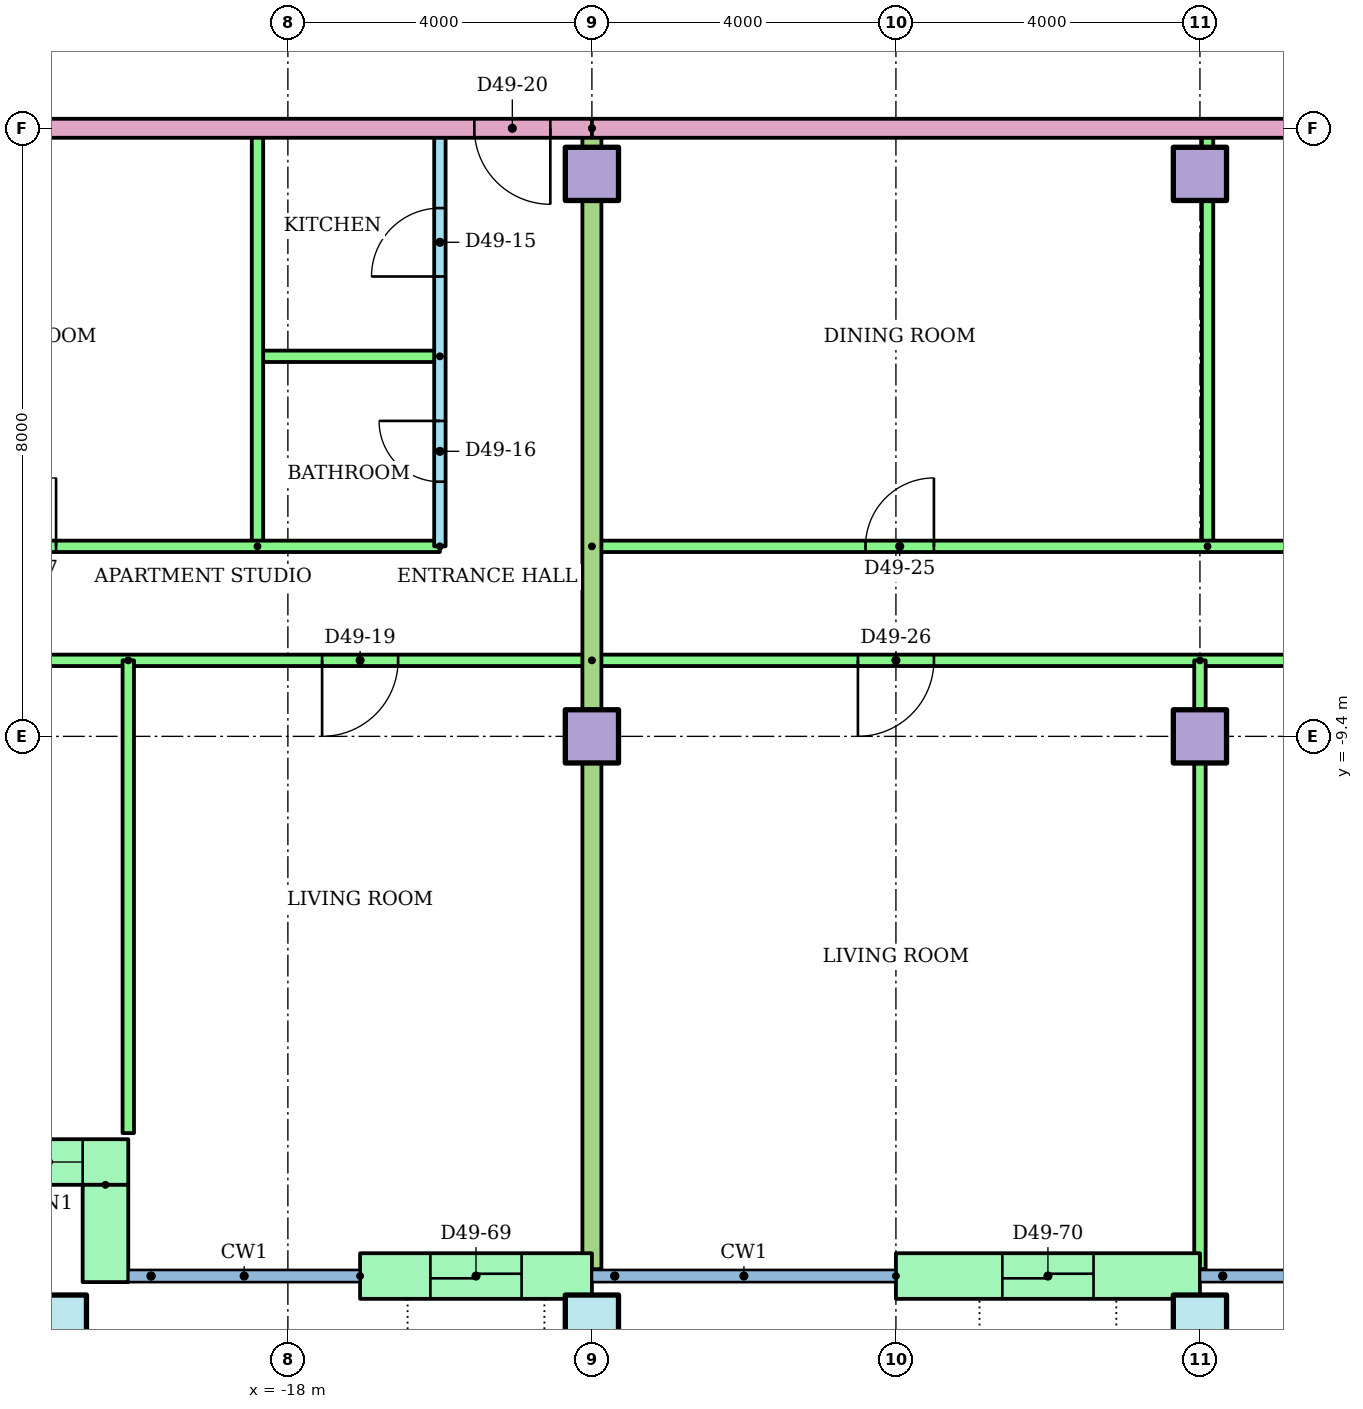
"""IFC4 building model, lengths in metres.
Left out: names, types, materials, properties, quantities, classifications, styles, units other than length and angle.
Written with IfcOpenShell. Run it as: python <this file> out.ifc"""

import sys

from ifc_helpers import new_model, si_unit, direction, frame, frame_2d, origin, origin_2d, place, context, subcontext, project, spatial, rectangle, hollow_rectangle, extrude, element, fill, save


model = new_model("IFC4")
c1 = context("Model", 3, precision=1e-05, world=origin(), true_north=direction((0.0, 1.0)))
c2 = subcontext(c1, "Body", "Model", "MODEL_VIEW")
j1 = project(units=[si_unit("LENGTHUNIT", "METRE"), si_unit("PLANEANGLEUNIT", "RADIAN")], contexts=[c1])
p1 = place(None, origin())
s1 = spatial("IfcSite", under=j1, at=p1, CompositionType="ELEMENT")
p2 = place(p1, origin())
s2 = spatial("IfcBuilding", under=s1, at=p2, CompositionType="ELEMENT")
p3 = place(p2, frame((0.0, 0.0, 187.7)))
s3 = spatial("IfcBuildingStorey", under=s2, at=p3, CompositionType="ELEMENT", Elevation=187.7)
for number, where in (
    (1, (-21.0, -17.1, 0.0)),
    (2, (-14.0, -17.1, 0.0)),
    (3, (-6.0, -17.1, 0.0)),
):
    element("IfcColumn", number, at=place(p3, frame(where)), inside=s3, PredefinedType="COLUMN", context=c2, shape_type="SweptSolid", body=[
        extrude(hollow_rectangle(XDim=0.7, YDim=0.7, WallThickness=0.036, at=origin_2d()), origin(), (0.0, 0.0, 1.0), 3.2),
    ])
for number, where in (
    (4, (-14.0, -9.4, 0.0)),
    (5, (-6.0, -9.4, 0.0)),
    (6, (-14.0, -2.0, 0.0)),
    (7, (-6.0, -2.0, 0.0)),
):
    element("IfcColumn", number, at=place(p3, frame(where)), inside=s3, PredefinedType="COLUMN", context=c2, shape_type="SweptSolid", body=[
        extrude(rectangle(XDim=0.7, YDim=0.7, at=origin_2d()), origin(), (0.0, 0.0, 1.0), 3.2),
    ])
p4 = place(p3, frame((-22.2, -15.0, 0.0)))
e8 = element("IfcWall", 8, at=p4, inside=s3, PredefinedType="STANDARD", context=c2, shape_type="SweptSolid", body=[
    extrude(rectangle(XDim=2.1, YDim=0.6, at=frame_2d((1.05, 0.0))), origin(), (0.0, 0.0, 1.0), 2.92),
])
p5 = place(p4, frame((0.6, 0.0, 0.9)))
e9 = element("IfcOpeningElement", 9, at=p5, cuts=e8, PredefinedType="OPENING", context=c2, shape_type="SweptSolid", body=[
    extrude(rectangle(XDim=0.9, YDim=1.5, at=frame_2d((0.45, 0.75))), frame((0.0, 0.31, 0.0), z_axis=(0.0, -1.0, 0.0), x_axis=(1.0, 0.0, 0.0)), (0.0, 0.0, 1.0), 0.62),
])
p6 = place(p3, frame((-20.4, -15.3, 0.0), z_axis=(0.0, 0.0, 1.0), x_axis=(0.0, -1.0, 0.0)))
e10 = element("IfcWall", 10, at=p6, inside=s3, PredefinedType="STANDARD", context=c2, shape_type="SweptSolid", body=[
    extrude(rectangle(XDim=1.28, YDim=0.6, at=frame_2d((0.64, 0.0))), origin(), (0.0, 0.0, 1.0), 2.92),
])
p7 = place(p3, frame((-17.05, -16.5, 0.0)))
e11 = element("IfcWall", 11, at=p7, inside=s3, PredefinedType="STANDARD", context=c2, shape_type="SweptSolid", body=[
    extrude(rectangle(XDim=3.05, YDim=0.6, at=frame_2d((1.525, 0.0))), origin(), (0.0, 0.0, 1.0), 2.92),
])
p8 = place(p7, frame((0.925, 0.0, 0.0)))
e12 = element("IfcOpeningElement", 12, at=p8, cuts=e11, PredefinedType="OPENING", context=c2, shape_type="SweptSolid", body=[
    extrude(rectangle(XDim=1.2, YDim=2.1, at=frame_2d((0.6, 1.05))), frame((0.0, 0.31, 0.0), z_axis=(0.0, -1.0, 0.0), x_axis=(1.0, 0.0, 0.0)), (0.0, 0.0, 1.0), 0.62),
])
p9 = place(p3, frame((-10.0, -16.5, 0.0)))
e13 = element("IfcWall", 13, at=p9, inside=s3, PredefinedType="STANDARD", context=c2, shape_type="SweptSolid", body=[
    extrude(rectangle(XDim=4.0, YDim=0.6, at=frame_2d((2.0, 0.0))), origin(), (0.0, 0.0, 1.0), 2.92),
])
p10 = place(p9, frame((1.4, 0.0, 0.0)))
e14 = element("IfcOpeningElement", 14, at=p10, cuts=e13, PredefinedType="OPENING", context=c2, shape_type="SweptSolid", body=[
    extrude(rectangle(XDim=1.2, YDim=2.1, at=frame_2d((0.6, 1.05))), frame((0.0, 0.31, 0.0), z_axis=(0.0, -1.0, 0.0), x_axis=(1.0, 0.0, 0.0)), (0.0, 0.0, 1.0), 0.62),
])
p11 = place(p3, frame((-16.0, -6.9, 0.0), z_axis=(0.0, 0.0, 1.0), x_axis=(0.0, 1.0, 0.0)))
e15 = element("IfcWall", 15, at=p11, inside=s3, PredefinedType="PARTITIONING", context=c2, shape_type="SweptSolid", body=[
    extrude(rectangle(XDim=5.5, YDim=0.15, at=frame_2d((2.75, 0.0))), origin(), (0.0, 0.0, 1.0), 2.4),
])
p12 = place(p11, frame((3.55, 0.0, 0.0)))
e16 = element("IfcOpeningElement", 16, at=p12, cuts=e15, PredefinedType="OPENING", context=c2, shape_type="SweptSolid", body=[
    extrude(rectangle(XDim=0.9, YDim=2.1, at=frame_2d((0.45, 1.05))), frame((0.0, 0.085, 0.0), z_axis=(0.0, -1.0, 0.0), x_axis=(1.0, 0.0, 0.0)), (0.0, 0.0, 1.0), 0.17),
])
p13 = place(p11, frame((0.85, 0.0, 0.0)))
e17 = element("IfcOpeningElement", 17, at=p13, cuts=e15, PredefinedType="OPENING", context=c2, shape_type="SweptSolid", body=[
    extrude(rectangle(XDim=0.8, YDim=2.1, at=frame_2d((0.4, 1.05))), frame((0.0, 0.085, 0.0), z_axis=(0.0, -1.0, 0.0), x_axis=(1.0, 0.0, 0.0)), (0.0, 0.0, 1.0), 0.17),
])
p14 = place(p3, frame((-16.0, -4.4, 0.0), z_axis=(0.0, 0.0, 1.0), x_axis=(-1.0, 0.0, 0.0)))
e18 = element("IfcWall", 18, at=p14, inside=s3, PredefinedType="PARTITIONING", context=c2, shape_type="SweptSolid", body=[
    extrude(rectangle(XDim=2.4, YDim=0.15, at=frame_2d((1.2, 0.0))), origin(), (0.0, 0.0, 1.0), 2.4),
])
p15 = place(p3, frame((-18.4, -6.9, 0.0), z_axis=(0.0, 0.0, 1.0), x_axis=(0.0, 1.0, 0.0)))
e19 = element("IfcWall", 19, at=p15, inside=s3, PredefinedType="PARTITIONING", context=c2, shape_type="SweptSolid", body=[
    extrude(rectangle(XDim=5.5, YDim=0.15, at=frame_2d((2.75, 0.0))), origin(), (0.0, 0.0, 1.0), 2.4),
])
p16 = place(p3, frame((-24.81, -6.9, 0.0)))
e20 = element("IfcWall", 20, at=p16, inside=s3, PredefinedType="PARTITIONING", context=c2, shape_type="SweptSolid", body=[
    extrude(rectangle(XDim=8.81, YDim=0.15, at=frame_2d((4.405, 0.0))), origin(), (0.0, 0.0, 1.0), 2.4),
])
p17 = place(p16, frame((2.86, 0.0, 0.0)))
e21 = element("IfcOpeningElement", 21, at=p17, cuts=e20, PredefinedType="OPENING", context=c2, shape_type="SweptSolid", body=[
    extrude(rectangle(XDim=0.9, YDim=2.1, at=frame_2d((0.45, 1.05))), frame((0.0, 0.085, 0.0), z_axis=(0.0, -1.0, 0.0), x_axis=(1.0, 0.0, 0.0)), (0.0, 0.0, 1.0), 0.17),
])
p18 = place(p3, frame((-14.0, -8.4, 0.0), z_axis=(0.0, 0.0, 1.0), x_axis=(-1.0, 0.0, 0.0)))
e22 = element("IfcWall", 22, at=p18, inside=s3, PredefinedType="PARTITIONING", context=c2, shape_type="SweptSolid", body=[
    extrude(rectangle(XDim=10.81, YDim=0.15, at=frame_2d((5.405, 0.0))), origin(), (0.0, 0.0, 1.0), 2.4),
])
p19 = place(p18, frame((8.547, 0.0, 0.0)))
e23 = element("IfcOpeningElement", 23, at=p19, cuts=e22, PredefinedType="OPENING", context=c2, shape_type="SweptSolid", body=[
    extrude(rectangle(XDim=1.0, YDim=2.1, at=frame_2d((0.5, 1.05))), frame((0.0, 0.085, 0.0), z_axis=(0.0, -1.0, 0.0), x_axis=(1.0, 0.0, 0.0)), (0.0, 0.0, 1.0), 0.17),
])
p20 = place(p18, frame((2.55, 0.0, 0.0)))
e24 = element("IfcOpeningElement", 24, at=p20, cuts=e22, PredefinedType="OPENING", context=c2, shape_type="SweptSolid", body=[
    extrude(rectangle(XDim=1.0, YDim=2.1, at=frame_2d((0.5, 1.05))), frame((0.0, 0.085, 0.0), z_axis=(0.0, -1.0, 0.0), x_axis=(1.0, 0.0, 0.0)), (0.0, 0.0, 1.0), 0.17),
])
p21 = place(p3, frame((-20.1, -8.4, 0.0), z_axis=(0.0, 0.0, 1.0), x_axis=(0.0, -1.0, 0.0)))
e25 = element("IfcWall", 25, at=p21, inside=s3, PredefinedType="PARTITIONING", context=c2, shape_type="SweptSolid", body=[
    extrude(rectangle(XDim=6.22, YDim=0.15, at=frame_2d((3.11, 0.0))), origin(), (0.0, 0.0, 1.0), 2.4),
])
p22 = place(p3, frame((-5.9, -6.9, 0.0), z_axis=(0.0, 0.0, 1.0), x_axis=(0.0, 1.0, 0.0)))
e26 = element("IfcWall", 26, at=p22, inside=s3, PredefinedType="PARTITIONING", context=c2, shape_type="SweptSolid", body=[
    extrude(rectangle(XDim=5.5, YDim=0.15, at=frame_2d((2.75, 0.0))), origin(), (0.0, 0.0, 1.0), 2.4),
])
p23 = place(p3, frame((-14.0, -6.9, 0.0)))
e27 = element("IfcWall", 27, at=p23, inside=s3, PredefinedType="PARTITIONING", context=c2, shape_type="SweptSolid", body=[
    extrude(rectangle(XDim=22.0, YDim=0.15, at=frame_2d((11.0, 0.0))), origin(), (0.0, 0.0, 1.0), 2.4),
])
p24 = place(p23, frame((16.65, 0.0, 0.0)))
e28 = element("IfcOpeningElement", 28, at=p24, cuts=e27, PredefinedType="OPENING", context=c2, shape_type="SweptSolid", body=[
    extrude(rectangle(XDim=0.9, YDim=2.1, at=frame_2d((0.45, 1.05))), frame((0.0, 0.085, 0.0), z_axis=(0.0, -1.0, 0.0), x_axis=(1.0, 0.0, 0.0)), (0.0, 0.0, 1.0), 0.17),
])
p25 = place(p23, frame((10.9, 0.0, 0.0)))
e29 = element("IfcOpeningElement", 29, at=p25, cuts=e27, PredefinedType="OPENING", context=c2, shape_type="SweptSolid", body=[
    extrude(rectangle(XDim=0.9, YDim=2.1, at=frame_2d((0.45, 1.05))), frame((0.0, 0.085, 0.0), z_axis=(0.0, -1.0, 0.0), x_axis=(1.0, 0.0, 0.0)), (0.0, 0.0, 1.0), 0.17),
])
p26 = place(p23, frame((3.6, 0.0, 0.0)))
e30 = element("IfcOpeningElement", 30, at=p26, cuts=e27, PredefinedType="OPENING", context=c2, shape_type="SweptSolid", body=[
    extrude(rectangle(XDim=0.9, YDim=2.1, at=frame_2d((0.45, 1.05))), frame((0.0, 0.085, 0.0), z_axis=(0.0, -1.0, 0.0), x_axis=(1.0, 0.0, 0.0)), (0.0, 0.0, 1.0), 0.17),
])
p27 = place(p3, frame((10.0, -8.4, 0.0), z_axis=(0.0, 0.0, 1.0), x_axis=(-1.0, 0.0, 0.0)))
e31 = element("IfcWall", 31, at=p27, inside=s3, PredefinedType="PARTITIONING", context=c2, shape_type="SweptSolid", body=[
    extrude(rectangle(XDim=24.0, YDim=0.15, at=frame_2d((12.0, 0.0))), origin(), (0.0, 0.0, 1.0), 2.4),
])
p28 = place(p27, frame((19.5, 0.0, 0.0)))
e32 = element("IfcOpeningElement", 32, at=p28, cuts=e31, PredefinedType="OPENING", context=c2, shape_type="SweptSolid", body=[
    extrude(rectangle(XDim=1.0, YDim=2.1, at=frame_2d((0.5, 1.05))), frame((0.0, 0.085, 0.0), z_axis=(0.0, -1.0, 0.0), x_axis=(1.0, 0.0, 0.0)), (0.0, 0.0, 1.0), 0.17),
])
p29 = place(p27, frame((13.55, 0.0, 0.0)))
e33 = element("IfcOpeningElement", 33, at=p29, cuts=e31, PredefinedType="OPENING", context=c2, shape_type="SweptSolid", body=[
    extrude(rectangle(XDim=0.9, YDim=2.1, at=frame_2d((0.45, 1.05))), frame((0.0, 0.085, 0.0), z_axis=(0.0, -1.0, 0.0), x_axis=(1.0, 0.0, 0.0)), (0.0, 0.0, 1.0), 0.17),
])
p30 = place(p27, frame((9.55, 0.0, 0.0)))
e34 = element("IfcOpeningElement", 34, at=p30, cuts=e31, PredefinedType="OPENING", context=c2, shape_type="SweptSolid", body=[
    extrude(rectangle(XDim=0.9, YDim=2.1, at=frame_2d((0.45, 1.05))), frame((0.0, 0.085, 0.0), z_axis=(0.0, -1.0, 0.0), x_axis=(1.0, 0.0, 0.0)), (0.0, 0.0, 1.0), 0.17),
])
p31 = place(p27, frame((5.55, 0.0, 0.0)))
e35 = element("IfcOpeningElement", 35, at=p31, cuts=e31, PredefinedType="OPENING", context=c2, shape_type="SweptSolid", body=[
    extrude(rectangle(XDim=0.9, YDim=2.1, at=frame_2d((0.45, 1.05))), frame((0.0, 0.085, 0.0), z_axis=(0.0, -1.0, 0.0), x_axis=(1.0, 0.0, 0.0)), (0.0, 0.0, 1.0), 0.17),
])
p32 = place(p27, frame((1.55, 0.0, 0.0)))
e36 = element("IfcOpeningElement", 36, at=p32, cuts=e31, PredefinedType="OPENING", context=c2, shape_type="SweptSolid", body=[
    extrude(rectangle(XDim=0.9, YDim=2.1, at=frame_2d((0.45, 1.05))), frame((0.0, 0.085, 0.0), z_axis=(0.0, -1.0, 0.0), x_axis=(1.0, 0.0, 0.0)), (0.0, 0.0, 1.0), 0.17),
])
p33 = place(p3, frame((-6.0, -8.4, 0.0), z_axis=(0.0, 0.0, 1.0), x_axis=(0.0, -1.0, 0.0)))
e37 = element("IfcWall", 37, at=p33, inside=s3, PredefinedType="PARTITIONING", context=c2, shape_type="SweptSolid", body=[
    extrude(rectangle(XDim=8.01, YDim=0.15, at=frame_2d((4.005, 0.0))), origin(), (0.0, 0.0, 1.0), 2.4),
])
p34 = place(p3, frame((-14.0, -1.4, 0.0), z_axis=(0.0, 0.0, 1.0), x_axis=(0.0, -1.0, 0.0)))
e38 = element("IfcWall", 38, at=p34, inside=s3, PredefinedType="PARTITIONING", context=c2, shape_type="SweptSolid", body=[
    extrude(rectangle(XDim=15.01, YDim=0.25, at=frame_2d((7.505, 0.0))), origin(), (0.0, 0.0, 1.0), 2.4),
])
p35 = place(p3, frame((-14.0, -1.4, 0.0), z_axis=(0.0, 0.0, 1.0), x_axis=(-1.0, 0.0, 0.0)))
e39 = element("IfcWall", 39, at=p35, inside=s3, PredefinedType="PARTITIONING", context=c2, shape_type="SweptSolid", body=[
    extrude(rectangle(XDim=10.82, YDim=0.25, at=frame_2d((5.41, 0.0))), origin(), (0.0, 0.0, 1.0), 2.4),
])
p36 = place(p35, frame((0.547, 0.0, 0.0)))
e40 = element("IfcOpeningElement", 40, at=p36, cuts=e39, PredefinedType="OPENING", context=c2, shape_type="SweptSolid", body=[
    extrude(rectangle(XDim=1.0, YDim=2.1, at=frame_2d((0.5, 1.05))), frame((0.0, 0.135, 0.0), z_axis=(0.0, -1.0, 0.0), x_axis=(1.0, 0.0, 0.0)), (0.0, 0.0, 1.0), 0.27),
])
p37 = place(p3, frame((14.0, -1.4, 0.0), z_axis=(0.0, 0.0, 1.0), x_axis=(-1.0, 0.0, 0.0)))
e41 = element("IfcWall", 41, at=p37, inside=s3, PredefinedType="PARTITIONING", context=c2, shape_type="SweptSolid", body=[
    extrude(rectangle(XDim=28.0, YDim=0.25, at=frame_2d((14.0, 0.0))), origin(), (0.0, 0.0, 1.0), 2.4),
])
p38 = place(p37, frame((4.547, 0.0, 0.0)))
e42 = element("IfcOpeningElement", 42, at=p38, cuts=e41, PredefinedType="OPENING", context=c2, shape_type="SweptSolid", body=[
    extrude(rectangle(XDim=1.0, YDim=2.1, at=frame_2d((0.5, 1.05))), frame((0.0, 0.135, 0.0), z_axis=(0.0, -1.0, 0.0), x_axis=(1.0, 0.0, 0.0)), (0.0, 0.0, 1.0), 0.27),
])
p39 = place(p37, frame((2.453, 0.0, 0.0)))
e43 = element("IfcOpeningElement", 43, at=p39, cuts=e41, PredefinedType="OPENING", context=c2, shape_type="SweptSolid", body=[
    extrude(rectangle(XDim=1.0, YDim=2.1, at=frame_2d((0.5, 1.05))), frame((0.0, 0.135, 0.0), z_axis=(0.0, -1.0, 0.0), x_axis=(1.0, 0.0, 0.0)), (0.0, 0.0, 1.0), 0.27),
])
p40 = place(p5, origin())
e44 = element("IfcWindow", 44, at=p40, inside=s3, PartitioningType="SINGLE_PANEL", PredefinedType="WINDOW", context=c2, shape_type="SweptSolid", body=[
    extrude(rectangle(XDim=0.9, YDim=1.5, at=frame_2d((0.45, 0.75))), frame((0.0, 0.03, 0.0), z_axis=(0.0, -1.0, 0.0), x_axis=(1.0, 0.0, 0.0)), (0.0, 0.0, 1.0), 0.06),
])
fill(e9, e44)
p41 = place(p12, origin())
e45 = element("IfcDoor", 45, at=p41, inside=s3, OperationType="SINGLE_SWING_LEFT", PredefinedType="DOOR", context=c2, shape_type="SweptSolid", body=[
    extrude(rectangle(XDim=0.9, YDim=2.1, at=frame_2d((0.45, 1.05))), frame((0.0, 0.025, 0.0), z_axis=(0.0, -1.0, 0.0), x_axis=(1.0, 0.0, 0.0)), (0.0, 0.0, 1.0), 0.05),
])
fill(e16, e45)
p42 = place(p13, origin())
e46 = element("IfcDoor", 46, at=p42, inside=s3, OperationType="SINGLE_SWING_RIGHT", PredefinedType="DOOR", context=c2, shape_type="SweptSolid", body=[
    extrude(rectangle(XDim=0.8, YDim=2.1, at=frame_2d((0.4, 1.05))), frame((0.0, 0.025, 0.0), z_axis=(0.0, -1.0, 0.0), x_axis=(1.0, 0.0, 0.0)), (0.0, 0.0, 1.0), 0.05),
])
fill(e17, e46)
p43 = place(p17, origin())
e47 = element("IfcDoor", 47, at=p43, inside=s3, OperationType="SINGLE_SWING_RIGHT", PredefinedType="DOOR", context=c2, shape_type="SweptSolid", body=[
    extrude(rectangle(XDim=0.9, YDim=2.1, at=frame_2d((0.45, 1.05))), frame((0.0, 0.025, 0.0), z_axis=(0.0, -1.0, 0.0), x_axis=(1.0, 0.0, 0.0)), (0.0, 0.0, 1.0), 0.05),
])
fill(e21, e47)
p44 = place(p20, origin())
e48 = element("IfcDoor", 48, at=p44, inside=s3, OperationType="SINGLE_SWING_RIGHT", PredefinedType="DOOR", context=c2, shape_type="SweptSolid", body=[
    extrude(rectangle(XDim=1.0, YDim=2.1, at=frame_2d((0.5, 1.05))), frame((0.0, 0.025, 0.0), z_axis=(0.0, -1.0, 0.0), x_axis=(1.0, 0.0, 0.0)), (0.0, 0.0, 1.0), 0.05),
])
fill(e24, e48)
p45 = place(p36, origin())
e49 = element("IfcDoor", 49, at=p45, inside=s3, OperationType="SINGLE_SWING_LEFT", PredefinedType="DOOR", context=c2, shape_type="SweptSolid", body=[
    extrude(rectangle(XDim=1.0, YDim=2.1, at=frame_2d((0.5, 1.05))), frame((0.0, 0.025, 0.0), z_axis=(0.0, -1.0, 0.0), x_axis=(1.0, 0.0, 0.0)), (0.0, 0.0, 1.0), 0.05),
])
fill(e40, e49)
p46 = place(p26, origin())
e50 = element("IfcDoor", 50, at=p46, inside=s3, OperationType="SINGLE_SWING_RIGHT", PredefinedType="DOOR", context=c2, shape_type="SweptSolid", body=[
    extrude(rectangle(XDim=0.9, YDim=2.1, at=frame_2d((0.45, 1.05))), frame((0.0, 0.025, 0.0), z_axis=(0.0, -1.0, 0.0), x_axis=(1.0, 0.0, 0.0)), (0.0, 0.0, 1.0), 0.05),
])
fill(e30, e50)
p47 = place(p28, origin())
e51 = element("IfcDoor", 51, at=p47, inside=s3, OperationType="SINGLE_SWING_RIGHT", PredefinedType="DOOR", context=c2, shape_type="SweptSolid", body=[
    extrude(rectangle(XDim=1.0, YDim=2.1, at=frame_2d((0.5, 1.05))), frame((0.0, 0.025, 0.0), z_axis=(0.0, -1.0, 0.0), x_axis=(1.0, 0.0, 0.0)), (0.0, 0.0, 1.0), 0.05),
])
fill(e32, e51)
p48 = place(p8, origin())
e52 = element("IfcDoor", 52, at=p48, inside=s3, OperationType="SLIDING_TO_LEFT", PredefinedType="DOOR", context=c2, shape_type="SweptSolid", body=[
    extrude(rectangle(XDim=1.2, YDim=2.1, at=frame_2d((0.6, 1.05))), frame((0.0, 0.025, 0.0), z_axis=(0.0, -1.0, 0.0), x_axis=(1.0, 0.0, 0.0)), (0.0, 0.0, 1.0), 0.05),
])
fill(e12, e52)
p49 = place(p10, origin())
e53 = element("IfcDoor", 53, at=p49, inside=s3, OperationType="SLIDING_TO_LEFT", PredefinedType="DOOR", context=c2, shape_type="SweptSolid", body=[
    extrude(rectangle(XDim=1.2, YDim=2.1, at=frame_2d((0.6, 1.05))), frame((0.0, 0.025, 0.0), z_axis=(0.0, -1.0, 0.0), x_axis=(1.0, 0.0, 0.0)), (0.0, 0.0, 1.0), 0.05),
])
fill(e14, e53)
save(model, sys.argv[1])
